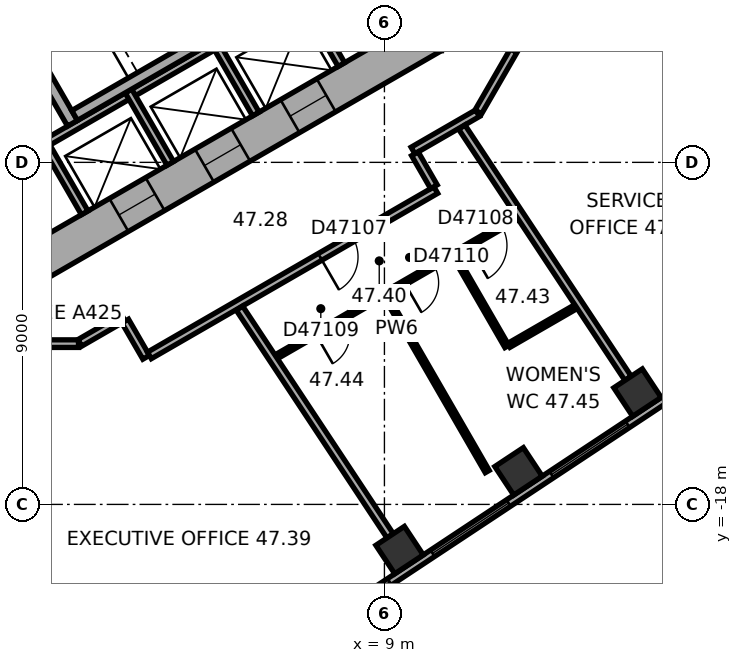
"""IFC4 building model, lengths in metres.
Left out: names, types, materials, properties, quantities, classifications, styles, units other than length and angle.
Written with IfcOpenShell. Run it as: python <this file> out.ifc"""

import sys

from ifc_helpers import new_model, si_unit, direction, frame, frame_2d, origin, origin_2d, place, context, subcontext, project, spatial, rectangle, extrude, element, fill, save


model = new_model("IFC4")
c1 = context("Model", 3, precision=1e-05, world=origin(), true_north=direction((0.0, 1.0)))
c2 = subcontext(c1, "Body", "Model", "MODEL_VIEW")
j1 = project(units=[si_unit("LENGTHUNIT", "METRE"), si_unit("PLANEANGLEUNIT", "RADIAN")], contexts=[c1])
p1 = place(None, origin())
s1 = spatial("IfcSite", under=j1, at=p1, CompositionType="ELEMENT")
p2 = place(p1, origin())
s2 = spatial("IfcBuilding", under=s1, at=p2, CompositionType="ELEMENT")
p3 = place(p2, frame((0.0, 0.0, 191.0)))
s3 = spatial("IfcBuildingStorey", under=s2, at=p3, CompositionType="ELEMENT", Elevation=191.0)
for number, where, z_axis, x_axis in (
    (1, (9.398, -19.202, 0.0), (0.0, 0.0, 1.0), (0.834, 0.552, 0.0)),
    (2, (12.529, -17.13, 0.0), (0.0, 0.0, 1.0), (0.834, 0.552, 0.0)),
    (3, (15.659, -15.058, 0.0), (0.0, 0.0, 1.0), (0.834, 0.552, 0.0)),
):
    element("IfcColumn", number, at=place(p3, frame(where, z_axis=z_axis, x_axis=x_axis)), inside=s3, PredefinedType="COLUMN", context=c2, shape_type="SweptSolid", body=[
        extrude(rectangle(XDim=0.9, YDim=0.9, at=origin_2d()), origin(), (0.0, 0.0, 1.0), 3.7),
    ])
p4 = place(p3, frame((-10.25, -5.629, 0.0), z_axis=(0.0, 0.0, 1.0), x_axis=(0.866022616891, -0.50000482701, 0.0)))
e4 = element("IfcWall", 4, at=p4, inside=s3, PredefinedType="SHEAR", context=c2, shape_type="SweptSolid", body=[
    extrude(rectangle(XDim=12.125, YDim=1.0, at=frame_2d((6.062, 0.0))), origin(), (0.0, 0.0, 1.0), 3.7),
])
p5 = place(p4, frame((6.262, 0.0, 0.0)))
e5 = element("IfcOpeningElement", 5, at=p5, cuts=e4, PredefinedType="OPENING", context=c2, shape_type="SweptSolid", body=[
    extrude(rectangle(XDim=1.5, YDim=2.1, at=frame_2d((0.75, 1.05))), frame((0.0, 0.51, 0.0), z_axis=(0.0, -1.0, 0.0), x_axis=(1.0, 0.0, 0.0)), (0.0, 0.0, 1.0), 1.02),
])
p6 = place(p4, frame((1.712, 0.0, 0.0)))
e6 = element("IfcOpeningElement", 6, at=p6, cuts=e4, PredefinedType="OPENING", context=c2, shape_type="SweptSolid", body=[
    extrude(rectangle(XDim=1.1, YDim=2.1, at=frame_2d((0.55, 1.05))), frame((0.0, 0.51, 0.0), z_axis=(0.0, -1.0, 0.0), x_axis=(1.0, 0.0, 0.0)), (0.0, 0.0, 1.0), 1.02),
])
p7 = place(p4, frame((4.312, 0.0, 0.0)))
e7 = element("IfcOpeningElement", 7, at=p7, cuts=e4, PredefinedType="OPENING", context=c2, shape_type="SweptSolid", body=[
    extrude(rectangle(XDim=1.1, YDim=2.1, at=frame_2d((0.55, 1.05))), frame((0.0, 0.51, 0.0), z_axis=(0.0, -1.0, 0.0), x_axis=(1.0, 0.0, 0.0)), (0.0, 0.0, 1.0), 1.02),
])
p8 = place(p3, frame((-0.25, -11.691, 0.0), z_axis=(0.0, 0.0, 1.0), x_axis=(0.866022616891, 0.50000482701, 0.0)))
e8 = element("IfcWall", 8, at=p8, inside=s3, PredefinedType="SHEAR", context=c2, shape_type="SweptSolid", body=[
    extrude(rectangle(XDim=12.125, YDim=1.0, at=frame_2d((6.062, 0.0))), origin(), (0.0, 0.0, 1.0), 3.7),
])
p9 = place(p8, frame((2.612, 0.0, 0.0)))
e9 = element("IfcOpeningElement", 9, at=p9, cuts=e8, PredefinedType="OPENING", context=c2, shape_type="SweptSolid", body=[
    extrude(rectangle(XDim=1.1, YDim=2.1, at=frame_2d((0.55, 1.05))), frame((0.0, 0.51, 0.0), z_axis=(0.0, -1.0, 0.0), x_axis=(1.0, 0.0, 0.0)), (0.0, 0.0, 1.0), 1.02),
])
p10 = place(p8, frame((5.212, 0.0, 0.0)))
e10 = element("IfcOpeningElement", 10, at=p10, cuts=e8, PredefinedType="OPENING", context=c2, shape_type="SweptSolid", body=[
    extrude(rectangle(XDim=1.1, YDim=2.1, at=frame_2d((0.55, 1.05))), frame((0.0, 0.51, 0.0), z_axis=(0.0, -1.0, 0.0), x_axis=(1.0, 0.0, 0.0)), (0.0, 0.0, 1.0), 1.02),
])
p11 = place(p8, frame((7.812, 0.0, 0.0)))
e11 = element("IfcOpeningElement", 11, at=p11, cuts=e8, PredefinedType="OPENING", context=c2, shape_type="SweptSolid", body=[
    extrude(rectangle(XDim=1.1, YDim=2.1, at=frame_2d((0.55, 1.05))), frame((0.0, 0.51, 0.0), z_axis=(0.0, -1.0, 0.0), x_axis=(1.0, 0.0, 0.0)), (0.0, 0.0, 1.0), 1.02),
])
p12 = place(p3, frame((2.911, -24.156, 0.0), z_axis=(0.0, 0.0, 1.0), x_axis=(0.833882163564, 0.551942512668, 0.0)))
e12 = element("IfcWall", 12, at=p12, inside=s3, PredefinedType="STANDARD", context=c2, shape_type="SweptSolid", body=[
    extrude(rectangle(XDim=20.044, YDim=0.2, at=frame_2d((10.022, 0.0))), origin(), (0.0, 0.0, 1.0), 3.7),
])
p13 = place(p12, frame((1.313, 0.0, 0.9)))
e13 = element("IfcOpeningElement", 13, at=p13, cuts=e12, PredefinedType="OPENING", context=c2, shape_type="SweptSolid", body=[
    extrude(rectangle(XDim=2.4, YDim=2.0, at=frame_2d((1.2, 1.0))), frame((0.0, 0.11, 0.0), z_axis=(0.0, -1.0, 0.0), x_axis=(1.0, 0.0, 0.0)), (0.0, 0.0, 1.0), 0.22),
])
p14 = place(p12, frame((5.067, 0.0, 0.9)))
e14 = element("IfcOpeningElement", 14, at=p14, cuts=e12, PredefinedType="OPENING", context=c2, shape_type="SweptSolid", body=[
    extrude(rectangle(XDim=2.4, YDim=2.0, at=frame_2d((1.2, 1.0))), frame((0.0, 0.11, 0.0), z_axis=(0.0, -1.0, 0.0), x_axis=(1.0, 0.0, 0.0)), (0.0, 0.0, 1.0), 0.22),
])
p15 = place(p12, frame((8.821, 0.0, 0.9)))
e15 = element("IfcOpeningElement", 15, at=p15, cuts=e12, PredefinedType="OPENING", context=c2, shape_type="SweptSolid", body=[
    extrude(rectangle(XDim=2.4, YDim=2.0, at=frame_2d((1.2, 1.0))), frame((0.0, 0.11, 0.0), z_axis=(0.0, -1.0, 0.0), x_axis=(1.0, 0.0, 0.0)), (0.0, 0.0, 1.0), 0.22),
])
p16 = place(p12, frame((12.575, 0.0, 0.9)))
e16 = element("IfcOpeningElement", 16, at=p16, cuts=e12, PredefinedType="OPENING", context=c2, shape_type="SweptSolid", body=[
    extrude(rectangle(XDim=2.4, YDim=2.0, at=frame_2d((1.2, 1.0))), frame((0.0, 0.11, 0.0), z_axis=(0.0, -1.0, 0.0), x_axis=(1.0, 0.0, 0.0)), (0.0, 0.0, 1.0), 0.22),
])
p17 = place(p12, frame((16.329, 0.0, 0.9)))
e17 = element("IfcOpeningElement", 17, at=p17, cuts=e12, PredefinedType="OPENING", context=c2, shape_type="SweptSolid", body=[
    extrude(rectangle(XDim=2.4, YDim=2.0, at=frame_2d((1.2, 1.0))), frame((0.0, 0.11, 0.0), z_axis=(0.0, -1.0, 0.0), x_axis=(1.0, 0.0, 0.0)), (0.0, 0.0, 1.0), 0.22),
])
p18 = place(p3, frame((-0.024, -8.559, 0.0), z_axis=(0.0, 0.0, 1.0), x_axis=(0.866026010844, 0.49999894854, 0.0)))
e18 = element("IfcWall", 18, at=p18, inside=s3, PredefinedType="PARTITIONING", context=c2, shape_type="SweptSolid", body=[
    extrude(rectangle(XDim=8.0, YDim=0.2, at=frame_2d((4.0, 0.0))), origin(), (0.0, 0.0, 1.0), 3.42),
])
for number, where, z_axis, x_axis in (
    (19, (0.013, -8.422, 0.0), (0.0, 0.0, 1.0), (0.5, -0.866, 0.0)),
    (20, (2.264, -7.122, 0.0), (0.0, 0.0, 1.0), (0.5, -0.866, 0.0)),
    (21, (4.516, -5.822, 0.0), (0.0, 0.0, 1.0), (0.5, -0.866, 0.0)),
    (22, (6.768, -4.522, 0.0), (0.0, 0.0, 1.0), (0.5, -0.866, 0.0)),
):
    element("IfcWall", number, at=place(p3, frame(where, z_axis=z_axis, x_axis=x_axis)), inside=s3, PredefinedType="PARTITIONING", context=c2, shape_type="SweptSolid", body=[
        extrude(rectangle(XDim=2.2, YDim=0.2, at=frame_2d((1.1, 0.0))), origin(), (0.0, 0.0, 1.0), 3.42),
    ])
p19 = place(p3, frame((-1.558, -3.902, 0.0), z_axis=(0.0, 0.0, 1.0), x_axis=(0.499977259774, -0.866038532462, 0.0)))
e23 = element("IfcWall", 23, at=p19, inside=s3, PredefinedType="SHEAR", context=c2, shape_type="SweptSolid", body=[
    extrude(rectangle(XDim=4.7, YDim=0.3, at=frame_2d((2.35, 0.0))), origin(), (0.0, 0.0, 1.0), 3.42),
])
p20 = place(p19, frame((0.8, 0.0, 0.0)))
e24 = element("IfcOpeningElement", 24, at=p20, cuts=e23, PredefinedType="OPENING", context=c2, shape_type="SweptSolid", body=[
    extrude(rectangle(XDim=1.2, YDim=2.1, at=frame_2d((0.6, 1.05))), frame((0.0, 0.16, 0.0), z_axis=(0.0, -1.0, 0.0), x_axis=(1.0, 0.0, 0.0)), (0.0, 0.0, 1.0), 0.32),
])
p21 = place(p3, frame((0.847, -7.767, 0.0), z_axis=(0.0, 0.0, 1.0), x_axis=(0.866027801685, 0.499995846692, 0.0)))
e25 = element("IfcWall", 25, at=p21, inside=s3, PredefinedType="SHEAR", context=c2, shape_type="SweptSolid", body=[
    extrude(rectangle(XDim=7.06, YDim=0.3, at=frame_2d((3.53, 0.0))), origin(), (0.0, 0.0, 1.0), 3.42),
])
p22 = place(p3, frame((-0.91, -13.77, 0.0), z_axis=(0.0, 0.0, 1.0), x_axis=(1.0, 0.0, 0.0)))
e26 = element("IfcWall", 26, at=p22, inside=s3, PredefinedType="PARTITIONING", context=c2, shape_type="SweptSolid", body=[
    extrude(rectangle(XDim=1.86, YDim=0.2, at=frame_2d((0.93, 0.0))), origin(), (0.0, 0.0, 1.0), 3.42),
])
p23 = place(p3, frame((0.985, -13.75, 0.0), z_axis=(0.0, 0.0, 1.0), x_axis=(0.866028661061, 0.499994358189, 0.0)))
e27 = element("IfcWall", 27, at=p23, inside=s3, PredefinedType="PARTITIONING", context=c2, shape_type="SweptSolid", body=[
    extrude(rectangle(XDim=1.321, YDim=0.2, at=frame_2d((0.661, 0.0))), origin(), (0.0, 0.0, 1.0), 3.42),
])
p24 = place(p3, frame((2.179, -13.176, 0.0), z_axis=(0.0, 0.0, 1.0), x_axis=(0.499978356969, -0.866037899034, 0.0)))
e28 = element("IfcWall", 28, at=p24, inside=s3, PredefinedType="PARTITIONING", context=c2, shape_type="SweptSolid", body=[
    extrude(rectangle(XDim=1.101, YDim=0.2, at=frame_2d((0.551, 0.0))), origin(), (0.0, 0.0, 1.0), 3.42),
])
p25 = place(p3, frame((2.816, -14.079, 0.0), z_axis=(0.0, 0.0, 1.0), x_axis=(0.866021128829, 0.500007404367, 0.0)))
e29 = element("IfcWall", 29, at=p25, inside=s3, PredefinedType="PARTITIONING", context=c2, shape_type="SweptSolid", body=[
    extrude(rectangle(XDim=8.702, YDim=0.2, at=frame_2d((4.351, 0.0))), origin(), (0.0, 0.0, 1.0), 3.42),
])
p26 = place(p25, frame((5.184, 0.0, 0.0)))
e30 = element("IfcOpeningElement", 30, at=p26, cuts=e29, PredefinedType="OPENING", context=c2, shape_type="SweptSolid", body=[
    extrude(rectangle(XDim=1.0, YDim=2.1, at=frame_2d((0.5, 1.05))), frame((0.0, 0.11, 0.0), z_axis=(0.0, -1.0, 0.0), x_axis=(1.0, 0.0, 0.0)), (0.0, 0.0, 1.0), 0.22),
])
p27 = place(p3, frame((6.152, -14.116, 0.0), z_axis=(0.0, 0.0, 1.0), x_axis=(0.866026788224, 0.499997602072, 0.0)))
e31 = element("IfcWall", 31, at=p27, inside=s3, PredefinedType="PARTITIONING", context=c2, shape_type="SweptSolid", body=[
    extrude(rectangle(XDim=7.322, YDim=0.12, at=frame_2d((3.661, 0.0))), origin(), (0.0, 0.0, 1.0), 3.42),
])
p28 = place(p27, frame((5.858, 0.0, 0.0)))
e32 = element("IfcOpeningElement", 32, at=p28, cuts=e31, PredefinedType="OPENING", context=c2, shape_type="SweptSolid", body=[
    extrude(rectangle(XDim=1.0, YDim=2.1, at=frame_2d((0.5, 1.05))), frame((0.0, 0.07, 0.0), z_axis=(0.0, -1.0, 0.0), x_axis=(1.0, 0.0, 0.0)), (0.0, 0.0, 1.0), 0.14),
])
p29 = place(p27, frame((1.2, 0.0, 0.0)))
e33 = element("IfcOpeningElement", 33, at=p29, cuts=e31, PredefinedType="OPENING", context=c2, shape_type="SweptSolid", body=[
    extrude(rectangle(XDim=0.9, YDim=2.1, at=frame_2d((0.45, 1.05))), frame((0.0, 0.07, 0.0), z_axis=(0.0, -1.0, 0.0), x_axis=(1.0, 0.0, 0.0)), (0.0, 0.0, 1.0), 0.14),
])
p30 = place(p27, frame((3.897, 0.0, 0.0)))
e34 = element("IfcOpeningElement", 34, at=p30, cuts=e31, PredefinedType="OPENING", context=c2, shape_type="SweptSolid", body=[
    extrude(rectangle(XDim=0.9, YDim=2.1, at=frame_2d((0.45, 1.05))), frame((0.0, 0.07, 0.0), z_axis=(0.0, -1.0, 0.0), x_axis=(1.0, 0.0, 0.0)), (0.0, 0.0, 1.0), 0.14),
])
p31 = place(p3, frame((9.15, -18.827, 0.0), z_axis=(0.0, 0.0, 1.0), x_axis=(-0.551928083938, 0.83389171369, 0.0)))
e35 = element("IfcWall", 35, at=p31, inside=s3, PredefinedType="PARTITIONING", context=c2, shape_type="SweptSolid", body=[
    extrude(rectangle(XDim=7.182, YDim=0.2, at=frame_2d((3.591, 0.0))), origin(), (0.0, 0.0, 1.0), 2.87),
])
p32 = place(p3, frame((9.752, -8.688, 0.0), z_axis=(0.0, 0.0, 1.0), x_axis=(0.865974105138, 0.500088841337, 0.0)))
e36 = element("IfcWall", 36, at=p32, inside=s3, PredefinedType="PARTITIONING", context=c2, shape_type="SweptSolid", body=[
    extrude(rectangle(XDim=1.961, YDim=0.2, at=frame_2d((0.98, 0.0))), origin(), (0.0, 0.0, 1.0), 3.42),
])
p33 = place(p3, frame((10.302, -9.642, 0.0), z_axis=(0.0, 0.0, 1.0), x_axis=(-0.500074377092, 0.865982457891, 0.0)))
e37 = element("IfcWall", 37, at=p33, inside=s3, PredefinedType="PARTITIONING", context=c2, shape_type="SweptSolid", body=[
    extrude(rectangle(XDim=1.001, YDim=0.2, at=frame_2d((0.5, 0.0))), origin(), (0.0, 0.0, 1.0), 3.42),
])
p34 = place(p3, frame((10.853, -11.472, 0.0), z_axis=(0.0, 0.0, 1.0), x_axis=(0.500048966069, -0.865997131366, 0.0)))
e38 = element("IfcWall", 38, at=p34, inside=s3, PredefinedType="PARTITIONING", context=c2, shape_type="SweptSolid", body=[
    extrude(rectangle(XDim=2.74, YDim=0.12, at=frame_2d((1.37, 0.0))), origin(), (0.0, 0.0, 1.0), 3.42),
])
p35 = place(p3, frame((11.47, -7.673, 0.0), z_axis=(0.0, 0.0, 1.0), x_axis=(0.499964847546, 0.866045698112, 0.0)))
e39 = element("IfcWall", 39, at=p35, inside=s3, PredefinedType="PARTITIONING", context=c2, shape_type="SweptSolid", body=[
    extrude(rectangle(XDim=1.86, YDim=0.2, at=frame_2d((0.93, 0.0))), origin(), (0.0, 0.0, 1.0), 3.42),
])
p36 = place(p3, frame((11.705, -17.136, 0.0), z_axis=(0.0, 0.0, 1.0), x_axis=(-0.499985382219, 0.8660338432, 0.0)))
e40 = element("IfcWall", 40, at=p36, inside=s3, PredefinedType="PARTITIONING", context=c2, shape_type="SweptSolid", body=[
    extrude(rectangle(XDim=5.332, YDim=0.12, at=frame_2d((2.666, 0.0))), origin(), (0.0, 0.0, 1.0), 3.42),
])
p37 = place(p3, frame((12.275, -13.814, 0.0), z_axis=(0.0, 0.0, 1.0), x_axis=(0.866010195725, 0.500026340207, 0.0)))
e41 = element("IfcWall", 41, at=p37, inside=s3, PredefinedType="PARTITIONING", context=c2, shape_type="SweptSolid", body=[
    extrude(rectangle(XDim=2.04, YDim=0.12, at=frame_2d((1.02, 0.0))), origin(), (0.0, 0.0, 1.0), 3.42),
])
p38 = place(p3, frame((15.411, -14.683, 0.0), z_axis=(0.0, 0.0, 1.0), x_axis=(-0.551932106251, 0.833889051427, 0.0)))
e42 = element("IfcWall", 42, at=p38, inside=s3, PredefinedType="PARTITIONING", context=c2, shape_type="SweptSolid", body=[
    extrude(rectangle(XDim=7.926, YDim=0.2, at=frame_2d((3.963, 0.0))), origin(), (0.0, 0.0, 1.0), 2.87),
])
p39 = place(p14, origin())
e43 = element("IfcWindow", 43, at=p39, inside=s3, PartitioningType="SINGLE_PANEL", PredefinedType="WINDOW", context=c2, shape_type="SweptSolid", body=[
    extrude(rectangle(XDim=2.4, YDim=2.0, at=frame_2d((1.2, 1.0))), frame((0.0, 0.03, 0.0), z_axis=(0.0, -1.0, 0.0), x_axis=(1.0, 0.0, 0.0)), (0.0, 0.0, 1.0), 0.06),
])
fill(e14, e43)
p40 = place(p15, origin())
e44 = element("IfcWindow", 44, at=p40, inside=s3, PartitioningType="SINGLE_PANEL", PredefinedType="WINDOW", context=c2, shape_type="SweptSolid", body=[
    extrude(rectangle(XDim=2.4, YDim=2.0, at=frame_2d((1.2, 1.0))), frame((0.0, 0.03, 0.0), z_axis=(0.0, -1.0, 0.0), x_axis=(1.0, 0.0, 0.0)), (0.0, 0.0, 1.0), 0.06),
])
fill(e15, e44)
p41 = place(p16, origin())
e45 = element("IfcWindow", 45, at=p41, inside=s3, PartitioningType="SINGLE_PANEL", PredefinedType="WINDOW", context=c2, shape_type="SweptSolid", body=[
    extrude(rectangle(XDim=2.4, YDim=2.0, at=frame_2d((1.2, 1.0))), frame((0.0, 0.03, 0.0), z_axis=(0.0, -1.0, 0.0), x_axis=(1.0, 0.0, 0.0)), (0.0, 0.0, 1.0), 0.06),
])
fill(e16, e45)
p42 = place(p9, origin())
e46 = element("IfcDoor", 46, at=p42, inside=s3, OperationType="DOUBLE_DOOR_SLIDING", PredefinedType="DOOR", context=c2, shape_type="SweptSolid", body=[
    extrude(rectangle(XDim=1.1, YDim=2.1, at=frame_2d((0.55, 1.05))), frame((0.0, 0.025, 0.0), z_axis=(0.0, -1.0, 0.0), x_axis=(1.0, 0.0, 0.0)), (0.0, 0.0, 1.0), 0.05),
])
fill(e9, e46)
p43 = place(p10, origin())
e47 = element("IfcDoor", 47, at=p43, inside=s3, OperationType="DOUBLE_DOOR_SLIDING", PredefinedType="DOOR", context=c2, shape_type="SweptSolid", body=[
    extrude(rectangle(XDim=1.1, YDim=2.1, at=frame_2d((0.55, 1.05))), frame((0.0, 0.025, 0.0), z_axis=(0.0, -1.0, 0.0), x_axis=(1.0, 0.0, 0.0)), (0.0, 0.0, 1.0), 0.05),
])
fill(e10, e47)
p44 = place(p11, origin())
e48 = element("IfcDoor", 48, at=p44, inside=s3, OperationType="DOUBLE_DOOR_SLIDING", PredefinedType="DOOR", context=c2, shape_type="SweptSolid", body=[
    extrude(rectangle(XDim=1.1, YDim=2.1, at=frame_2d((0.55, 1.05))), frame((0.0, 0.025, 0.0), z_axis=(0.0, -1.0, 0.0), x_axis=(1.0, 0.0, 0.0)), (0.0, 0.0, 1.0), 0.05),
])
fill(e11, e48)
p45 = place(p26, origin())
e49 = element("IfcDoor", 49, at=p45, inside=s3, OperationType="SINGLE_SWING_LEFT", PredefinedType="DOOR", context=c2, shape_type="SweptSolid", body=[
    extrude(rectangle(XDim=1.0, YDim=2.1, at=frame_2d((0.5, 1.05))), frame((0.0, 0.025, 0.0), z_axis=(0.0, -1.0, 0.0), x_axis=(1.0, 0.0, 0.0)), (0.0, 0.0, 1.0), 0.05),
])
fill(e30, e49)
p46 = place(p28, origin())
e50 = element("IfcDoor", 50, at=p46, inside=s3, OperationType="SINGLE_SWING_LEFT", PredefinedType="DOOR", context=c2, shape_type="SweptSolid", body=[
    extrude(rectangle(XDim=1.0, YDim=2.1, at=frame_2d((0.5, 1.05))), frame((0.0, 0.025, 0.0), z_axis=(0.0, -1.0, 0.0), x_axis=(1.0, 0.0, 0.0)), (0.0, 0.0, 1.0), 0.05),
])
fill(e32, e50)
p47 = place(p29, origin())
e51 = element("IfcDoor", 51, at=p47, inside=s3, OperationType="SINGLE_SWING_LEFT", PredefinedType="DOOR", context=c2, shape_type="SweptSolid", body=[
    extrude(rectangle(XDim=0.9, YDim=2.1, at=frame_2d((0.45, 1.05))), frame((0.0, 0.025, 0.0), z_axis=(0.0, -1.0, 0.0), x_axis=(1.0, 0.0, 0.0)), (0.0, 0.0, 1.0), 0.05),
])
fill(e33, e51)
p48 = place(p30, origin())
e52 = element("IfcDoor", 52, at=p48, inside=s3, OperationType="SINGLE_SWING_LEFT", PredefinedType="DOOR", context=c2, shape_type="SweptSolid", body=[
    extrude(rectangle(XDim=0.9, YDim=2.1, at=frame_2d((0.45, 1.05))), frame((0.0, 0.025, 0.0), z_axis=(0.0, -1.0, 0.0), x_axis=(1.0, 0.0, 0.0)), (0.0, 0.0, 1.0), 0.05),
])
fill(e34, e52)
save(model, sys.argv[1])
